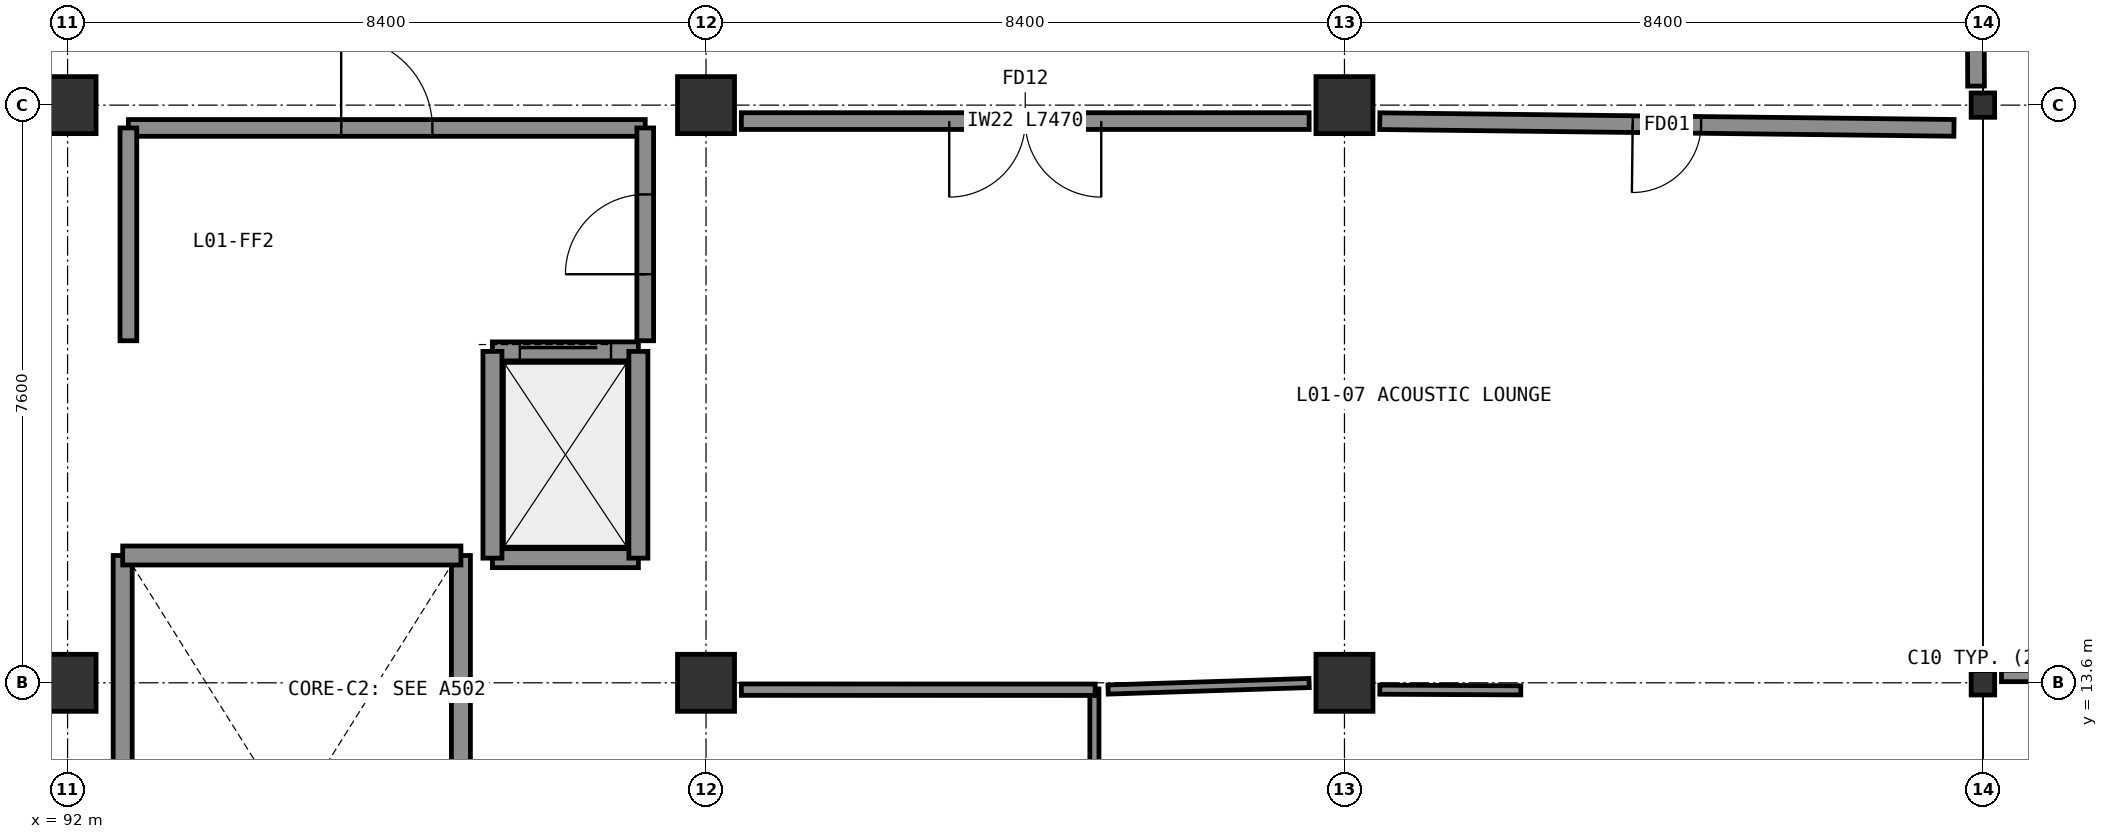
"""IFC4 building model, lengths in metres.
Left out: names, types, materials, properties, quantities, classifications, styles, units other than length and angle.
Written with IfcOpenShell. Run it as: python <this file> out.ifc"""

import sys

from ifc_helpers import new_model, si_unit, direction, frame, frame_2d, origin, origin_2d, place, context, subcontext, project, spatial, rectangle, i_section, extrude, element, fill, save


model = new_model("IFC4")
c1 = context("Model", 3, precision=1e-05, world=origin(), true_north=direction((0.0, 1.0)))
c2 = subcontext(c1, "Body", "Model", "MODEL_VIEW")
j1 = project(units=[si_unit("LENGTHUNIT", "METRE"), si_unit("PLANEANGLEUNIT", "RADIAN")], contexts=[c1])
p1 = place(None, origin())
s1 = spatial("IfcSite", under=j1, at=p1, CompositionType="ELEMENT")
p2 = place(p1, origin())
s2 = spatial("IfcBuilding", under=s1, at=p2, CompositionType="ELEMENT")
p3 = place(p2, frame((0.0, 0.0, 4.8)))
s3 = spatial("IfcBuildingStorey", under=s2, at=p3, CompositionType="ELEMENT", Elevation=4.8)
for number, where, z_axis, x_axis in (
    (1, (92.0, 13.6, 0.0), (0.0, 0.0, 1.0), (1.0, 0.0, 0.0)),
    (2, (100.4, 13.6, 0.0), (0.0, 0.0, 1.0), (1.0, 0.0, 0.0)),
    (3, (108.8, 13.6, 0.0), (0.0, 0.0, 1.0), (1.0, 0.0, 0.0)),
):
    element("IfcColumn", number, at=place(p3, frame(where, z_axis=z_axis, x_axis=x_axis)), inside=s3, PredefinedType="COLUMN", context=c2, shape_type="SweptSolid", body=[
        extrude(rectangle(XDim=0.75, YDim=0.75, at=origin_2d()), origin(), (0.0, 0.0, 1.0), 4.8),
    ])
p4 = place(p3, frame((117.2, 13.6, 0.0), z_axis=(0.0, 0.0, 1.0), x_axis=(1.0, 0.0, 0.0)))
e4 = element("IfcColumn", 4, at=p4, inside=s3, PredefinedType="COLUMN", context=c2, shape_type="SweptSolid", body=[
    extrude(i_section(OverallWidth=0.309, OverallDepth=0.321, WebThickness=0.014, FlangeThickness=0.022, FilletRadius=0.015, at=origin_2d()), origin(), (0.0, 0.0, 1.0), 4.8),
])
for number, where, z_axis, x_axis in (
    (5, (92.0, 21.2, 0.0), (0.0, 0.0, 1.0), (1.0, 0.0, 0.0)),
    (6, (100.4, 21.2, 0.0), (0.0, 0.0, 1.0), (1.0, 0.0, 0.0)),
    (7, (108.8, 21.2, 0.0), (0.0, 0.0, 1.0), (1.0, 0.0, 0.0)),
):
    element("IfcColumn", number, at=place(p3, frame(where, z_axis=z_axis, x_axis=x_axis)), inside=s3, PredefinedType="COLUMN", context=c2, shape_type="SweptSolid", body=[
        extrude(rectangle(XDim=0.75, YDim=0.75, at=origin_2d()), origin(), (0.0, 0.0, 1.0), 4.8),
    ])
p5 = place(p3, frame((117.2, 21.2, 0.0), z_axis=(0.0, 0.0, 1.0), x_axis=(1.0, 0.0, 0.0)))
e8 = element("IfcColumn", 8, at=p5, inside=s3, PredefinedType="COLUMN", context=c2, shape_type="SweptSolid", body=[
    extrude(i_section(OverallWidth=0.309, OverallDepth=0.321, WebThickness=0.014, FlangeThickness=0.022, FilletRadius=0.015, at=origin_2d()), origin(), (0.0, 0.0, 1.0), 4.8),
])
p6 = place(p3, frame((92.725, 6.225, 0.0), z_axis=(0.0, 0.0, 1.0), x_axis=(0.0, 1.0, 0.0)))
e9 = element("IfcWall", 9, at=p6, inside=s3, PredefinedType="SHEAR", context=c2, shape_type="SweptSolid", body=[
    extrude(rectangle(XDim=9.05, YDim=0.25, at=frame_2d((4.525, 0.0))), origin(), (0.0, 0.0, 1.0), 4.54),
])
p7 = place(p3, frame((97.175, 6.225, 0.0), z_axis=(0.0, 0.0, 1.0), x_axis=(0.0, 1.0, 0.0)))
e10 = element("IfcWall", 10, at=p7, inside=s3, PredefinedType="SHEAR", context=c2, shape_type="SweptSolid", body=[
    extrude(rectangle(XDim=9.05, YDim=0.25, at=frame_2d((4.525, 0.0))), origin(), (0.0, 0.0, 1.0), 4.54),
])
p8 = place(p7, frame((0.55, 0.0, 0.0)))
e11 = element("IfcOpeningElement", 11, at=p8, cuts=e10, PredefinedType="OPENING", context=c2, shape_type="SweptSolid", body=[
    extrude(rectangle(XDim=1.05, YDim=2.1, at=frame_2d((0.525, 1.05))), frame((0.0, 0.135, 0.0), z_axis=(0.0, -1.0, 0.0), x_axis=(1.0, 0.0, 0.0)), (0.0, 0.0, 1.0), 0.27),
])
p9 = place(p3, frame((92.725, 15.275, 0.0), z_axis=(0.0, 0.0, 1.0), x_axis=(1.0, 0.0, 0.0)))
e12 = element("IfcWall", 12, at=p9, inside=s3, PredefinedType="SHEAR", context=c2, shape_type="SweptSolid", body=[
    extrude(rectangle(XDim=4.45, YDim=0.25, at=frame_2d((2.225, 0.0))), origin(), (0.0, 0.0, 1.0), 4.54),
])
p10 = place(p3, frame((92.8, 20.9, 0.0), z_axis=(0.0, 0.0, 1.0), x_axis=(1.0, 0.0, 0.0)))
e13 = element("IfcWall", 13, at=p10, inside=s3, PredefinedType="SOLIDWALL", context=c2, shape_type="SweptSolid", body=[
    extrude(rectangle(XDim=6.8, YDim=0.22, at=frame_2d((3.4, 0.0))), origin(), (0.0, 0.0, 1.0), 4.43),
])
p11 = place(p10, frame((2.8, 0.0, 0.0)))
e14 = element("IfcOpeningElement", 14, at=p11, cuts=e13, PredefinedType="OPENING", context=c2, shape_type="SweptSolid", body=[
    extrude(rectangle(XDim=1.2, YDim=2.1, at=frame_2d((0.6, 1.05))), frame((0.0, 0.12, 0.0), z_axis=(0.0, -1.0, 0.0), x_axis=(1.0, 0.0, 0.0)), (0.0, 0.0, 1.0), 0.24),
])
p12 = place(p3, frame((92.8, 18.1, 0.0), z_axis=(0.0, 0.0, 1.0), x_axis=(0.0, 1.0, 0.0)))
e15 = element("IfcWall", 15, at=p12, inside=s3, PredefinedType="SOLIDWALL", context=c2, shape_type="SweptSolid", body=[
    extrude(rectangle(XDim=2.8, YDim=0.22, at=frame_2d((1.4, 0.0))), origin(), (0.0, 0.0, 1.0), 4.43),
])
p13 = place(p3, frame((99.6, 18.1, 0.0), z_axis=(0.0, 0.0, 1.0), x_axis=(0.0, 1.0, 0.0)))
e16 = element("IfcWall", 16, at=p13, inside=s3, PredefinedType="SOLIDWALL", context=c2, shape_type="SweptSolid", body=[
    extrude(rectangle(XDim=2.8, YDim=0.22, at=frame_2d((1.4, 0.0))), origin(), (0.0, 0.0, 1.0), 4.43),
])
p14 = place(p13, frame((0.875, 0.0, 0.0)))
e17 = element("IfcOpeningElement", 17, at=p14, cuts=e16, PredefinedType="OPENING", context=c2, shape_type="SweptSolid", body=[
    extrude(rectangle(XDim=1.05, YDim=2.1, at=frame_2d((0.525, 1.05))), frame((0.0, 0.12, 0.0), z_axis=(0.0, -1.0, 0.0), x_axis=(1.0, 0.0, 0.0)), (0.0, 0.0, 1.0), 0.24),
])
p15 = place(p3, frame((97.59, 15.24, 0.0), z_axis=(0.0, 0.0, 1.0), x_axis=(1.0, 0.0, 0.0)))
e18 = element("IfcWall", 18, at=p15, inside=s3, PredefinedType="SHEAR", context=c2, shape_type="SweptSolid", body=[
    extrude(rectangle(XDim=1.92, YDim=0.25, at=frame_2d((0.96, 0.0))), origin(), (0.0, 0.0, 1.0), 4.54),
])
p16 = place(p3, frame((97.59, 17.96, 0.0), z_axis=(0.0, 0.0, 1.0), x_axis=(1.0, 0.0, 0.0)))
e19 = element("IfcWall", 19, at=p16, inside=s3, PredefinedType="SHEAR", context=c2, shape_type="SweptSolid", body=[
    extrude(rectangle(XDim=1.92, YDim=0.25, at=frame_2d((0.96, 0.0))), origin(), (0.0, 0.0, 1.0), 4.54),
])
p17 = place(p16, frame((0.36, 0.0, 0.0)))
e20 = element("IfcOpeningElement", 20, at=p17, cuts=e19, PredefinedType="OPENING", context=c2, shape_type="SweptSolid", body=[
    extrude(rectangle(XDim=1.2, YDim=2.2, at=frame_2d((0.6, 1.1))), frame((0.0, 0.135, 0.0), z_axis=(0.0, -1.0, 0.0), x_axis=(1.0, 0.0, 0.0)), (0.0, 0.0, 1.0), 0.27),
])
for number, where, z_axis, x_axis in (
    (21, (97.59, 15.24, 0.0), (0.0, 0.0, 1.0), (0.0, 1.0, 0.0)),
    (22, (99.51, 15.24, 0.0), (0.0, 0.0, 1.0), (0.0, 1.0, 0.0)),
):
    element("IfcWall", number, at=place(p3, frame(where, z_axis=z_axis, x_axis=x_axis)), inside=s3, PredefinedType="SHEAR", context=c2, shape_type="SweptSolid", body=[
        extrude(rectangle(XDim=2.72, YDim=0.25, at=frame_2d((1.36, 0.0))), origin(), (0.0, 0.0, 1.0), 4.54),
    ])
p18 = place(p3, frame((108.335, 20.99, 0.0), z_axis=(0.0, 0.0, 1.0), x_axis=(-1.0, 0.0, 0.0)))
e23 = element("IfcWall", 23, at=p18, inside=s3, PredefinedType="SOLIDWALL", context=c2, shape_type="SweptSolid", body=[
    extrude(rectangle(XDim=7.47, YDim=0.22, at=frame_2d((3.735, 0.0))), origin(), (0.0, 0.0, 1.0), 3.735),
])
p19 = place(p18, frame((2.735, 0.0, 0.0)))
e24 = element("IfcOpeningElement", 24, at=p19, cuts=e23, PredefinedType="OPENING", context=c2, shape_type="SweptSolid", body=[
    extrude(rectangle(XDim=2.0, YDim=2.25, at=frame_2d((1.0, 1.125))), frame((0.0, 0.12, 0.0), z_axis=(0.0, -1.0, 0.0), x_axis=(1.0, 0.0, 0.0)), (0.0, 0.0, 1.0), 0.24),
])
p20 = place(p3, frame((116.82, 20.901, 0.0), z_axis=(0.0, 0.0, 1.0), x_axis=(-0.999931956417, 0.011665441968, 0.0)))
e25 = element("IfcWall", 25, at=p20, inside=s3, PredefinedType="SOLIDWALL", context=c2, shape_type="SweptSolid", body=[
    extrude(rectangle(XDim=7.555, YDim=0.22, at=frame_2d((3.778, 0.0))), origin(), (0.0, 0.0, 1.0), 4.43),
])
p21 = place(p20, frame((3.327, 0.0, 0.0)))
e26 = element("IfcOpeningElement", 26, at=p21, cuts=e25, PredefinedType="OPENING", context=c2, shape_type="SweptSolid", body=[
    extrude(rectangle(XDim=0.9, YDim=2.1, at=frame_2d((0.45, 1.05))), frame((0.0, 0.12, 0.0), z_axis=(0.0, -1.0, 0.0), x_axis=(1.0, 0.0, 0.0)), (0.0, 0.0, 1.0), 0.24),
])
p22 = place(p3, frame((125.355, 13.69, 0.0), z_axis=(0.0, 0.0, 1.0), x_axis=(-1.0, 0.0, 0.0)))
e27 = element("IfcWall", 27, at=p22, inside=s3, PredefinedType="PARTITIONING", context=c2, shape_type="SweptSolid", body=[
    extrude(rectangle(XDim=7.911, YDim=0.15, at=frame_2d((3.956, 0.0))), origin(), (0.0, 0.0, 1.0), 4.43),
])
p23 = place(p22, frame((3.415, 0.0, 0.0)))
e28 = element("IfcOpeningElement", 28, at=p23, cuts=e27, PredefinedType="OPENING", context=c2, shape_type="SweptSolid", body=[
    extrude(rectangle(XDim=1.08, YDim=2.12, at=frame_2d((0.54, 1.06))), frame((0.0, 0.085, 0.0), z_axis=(0.0, -1.0, 0.0), x_axis=(1.0, 0.0, 0.0)), (0.0, 0.0, 1.0), 0.17),
])
p24 = place(p3, frame((117.101, 24.32, 0.0), z_axis=(0.0, 0.0, 1.0), x_axis=(0.003062512223, -0.999995310498, 0.0)))
e29 = element("IfcWall", 29, at=p24, inside=s3, PredefinedType="SOLIDWALL", context=c2, shape_type="SweptSolid", body=[
    extrude(rectangle(XDim=2.87, YDim=0.22, at=frame_2d((1.435, 0.0))), origin(), (0.0, 0.0, 1.0), 4.43),
])
p25 = place(p24, frame((0.96, 0.0, 0.0)))
e30 = element("IfcOpeningElement", 30, at=p25, cuts=e29, PredefinedType="OPENING", context=c2, shape_type="SweptSolid", body=[
    extrude(rectangle(XDim=0.95, YDim=2.1, at=frame_2d((0.475, 1.05))), frame((0.0, 0.12, 0.0), z_axis=(0.0, -1.0, 0.0), x_axis=(1.0, 0.0, 0.0)), (0.0, 0.0, 1.0), 0.24),
])
p26 = place(p3, frame((105.51, 13.52, 0.0), z_axis=(0.0, 0.0, 1.0), x_axis=(0.0, -1.0, 0.0)))
e31 = element("IfcWall", 31, at=p26, inside=s3, PredefinedType="PARTITIONING", context=c2, shape_type="SweptSolid", body=[
    extrude(rectangle(XDim=7.12, YDim=0.12, at=frame_2d((3.56, 0.0))), origin(), (0.0, 0.0, 1.0), 4.43),
])
p27 = place(p26, frame((3.12, 0.0, 0.0)))
e32 = element("IfcOpeningElement", 32, at=p27, cuts=e31, PredefinedType="OPENING", context=c2, shape_type="SweptSolid", body=[
    extrude(rectangle(XDim=0.88, YDim=2.08, at=frame_2d((0.44, 1.04))), frame((0.0, 0.07, 0.0), z_axis=(0.0, -1.0, 0.0), x_axis=(1.0, 0.0, 0.0)), (0.0, 0.0, 1.0), 0.14),
])
p28 = place(p3, frame((100.865, 13.51, 0.0), z_axis=(0.0, 0.0, 1.0), x_axis=(0.999999965617, -0.000262233169, 0.0)))
e33 = element("IfcWall", 33, at=p28, inside=s3, PredefinedType="PARTITIONING", context=c2, shape_type="SweptSolid", body=[
    extrude(rectangle(XDim=4.655, YDim=0.15, at=frame_2d((2.328, 0.0))), origin(), (0.0, 0.0, 1.0), 3.735),
])
p29 = place(p3, frame((105.69, 13.511, 0.0), z_axis=(0.0, 0.0, 1.0), x_axis=(0.999469609023, 0.032565328778, 0.0)))
e34 = element("IfcWall", 34, at=p29, inside=s3, PredefinedType="PARTITIONING", context=c2, shape_type="SweptSolid", body=[
    extrude(rectangle(XDim=2.646, YDim=0.12, at=frame_2d((1.323, 0.0))), origin(), (0.0, 0.0, 1.0), 3.735),
])
p30 = place(p3, frame((109.265, 13.51, 0.0), z_axis=(0.0, 0.0, 1.0), x_axis=(0.999989393153, -0.00460582034, 0.0)))
e35 = element("IfcWall", 35, at=p30, inside=s3, PredefinedType="PARTITIONING", context=c2, shape_type="SweptSolid", body=[
    extrude(rectangle(XDim=1.855, YDim=0.12, at=frame_2d((0.928, 0.0))), origin(), (0.0, 0.0, 1.0), 4.43),
])
p31 = place(p11, origin())
e36 = element("IfcDoor", 36, at=p31, inside=s3, OperationType="SINGLE_SWING_LEFT", PredefinedType="DOOR", context=c2, shape_type="SweptSolid", body=[
    extrude(rectangle(XDim=1.2, YDim=2.1, at=frame_2d((0.6, 1.05))), frame((0.0, 0.025, 0.0), z_axis=(0.0, -1.0, 0.0), x_axis=(1.0, 0.0, 0.0)), (0.0, 0.0, 1.0), 0.05),
])
fill(e14, e36)
p32 = place(p14, origin())
e37 = element("IfcDoor", 37, at=p32, inside=s3, OperationType="SINGLE_SWING_LEFT", PredefinedType="DOOR", context=c2, shape_type="SweptSolid", body=[
    extrude(rectangle(XDim=1.05, YDim=2.1, at=frame_2d((0.525, 1.05))), frame((0.0, 0.025, 0.0), z_axis=(0.0, -1.0, 0.0), x_axis=(1.0, 0.0, 0.0)), (0.0, 0.0, 1.0), 0.05),
])
fill(e17, e37)
p33 = place(p17, origin())
e38 = element("IfcDoor", 38, at=p33, inside=s3, OperationType="SLIDING_TO_LEFT", PredefinedType="DOOR", context=c2, shape_type="SweptSolid", body=[
    extrude(rectangle(XDim=1.2, YDim=2.2, at=frame_2d((0.6, 1.1))), frame((0.0, 0.025, 0.0), z_axis=(0.0, -1.0, 0.0), x_axis=(1.0, 0.0, 0.0)), (0.0, 0.0, 1.0), 0.05),
])
fill(e20, e38)
p34 = place(p19, origin())
e39 = element("IfcDoor", 39, at=p34, inside=s3, OperationType="DOUBLE_DOOR_SINGLE_SWING", PredefinedType="DOOR", context=c2, shape_type="SweptSolid", body=[
    extrude(rectangle(XDim=2.0, YDim=2.25, at=frame_2d((1.0, 1.125))), frame((0.0, 0.025, 0.0), z_axis=(0.0, -1.0, 0.0), x_axis=(1.0, 0.0, 0.0)), (0.0, 0.0, 1.0), 0.05),
])
fill(e24, e39)
p35 = place(p21, origin())
e40 = element("IfcDoor", 40, at=p35, inside=s3, OperationType="SINGLE_SWING_RIGHT", PredefinedType="DOOR", context=c2, shape_type="SweptSolid", body=[
    extrude(rectangle(XDim=0.9, YDim=2.1, at=frame_2d((0.45, 1.05))), frame((0.0, 0.025, 0.0), z_axis=(0.0, -1.0, 0.0), x_axis=(1.0, 0.0, 0.0)), (0.0, 0.0, 1.0), 0.05),
])
fill(e26, e40)
save(model, sys.argv[1])
